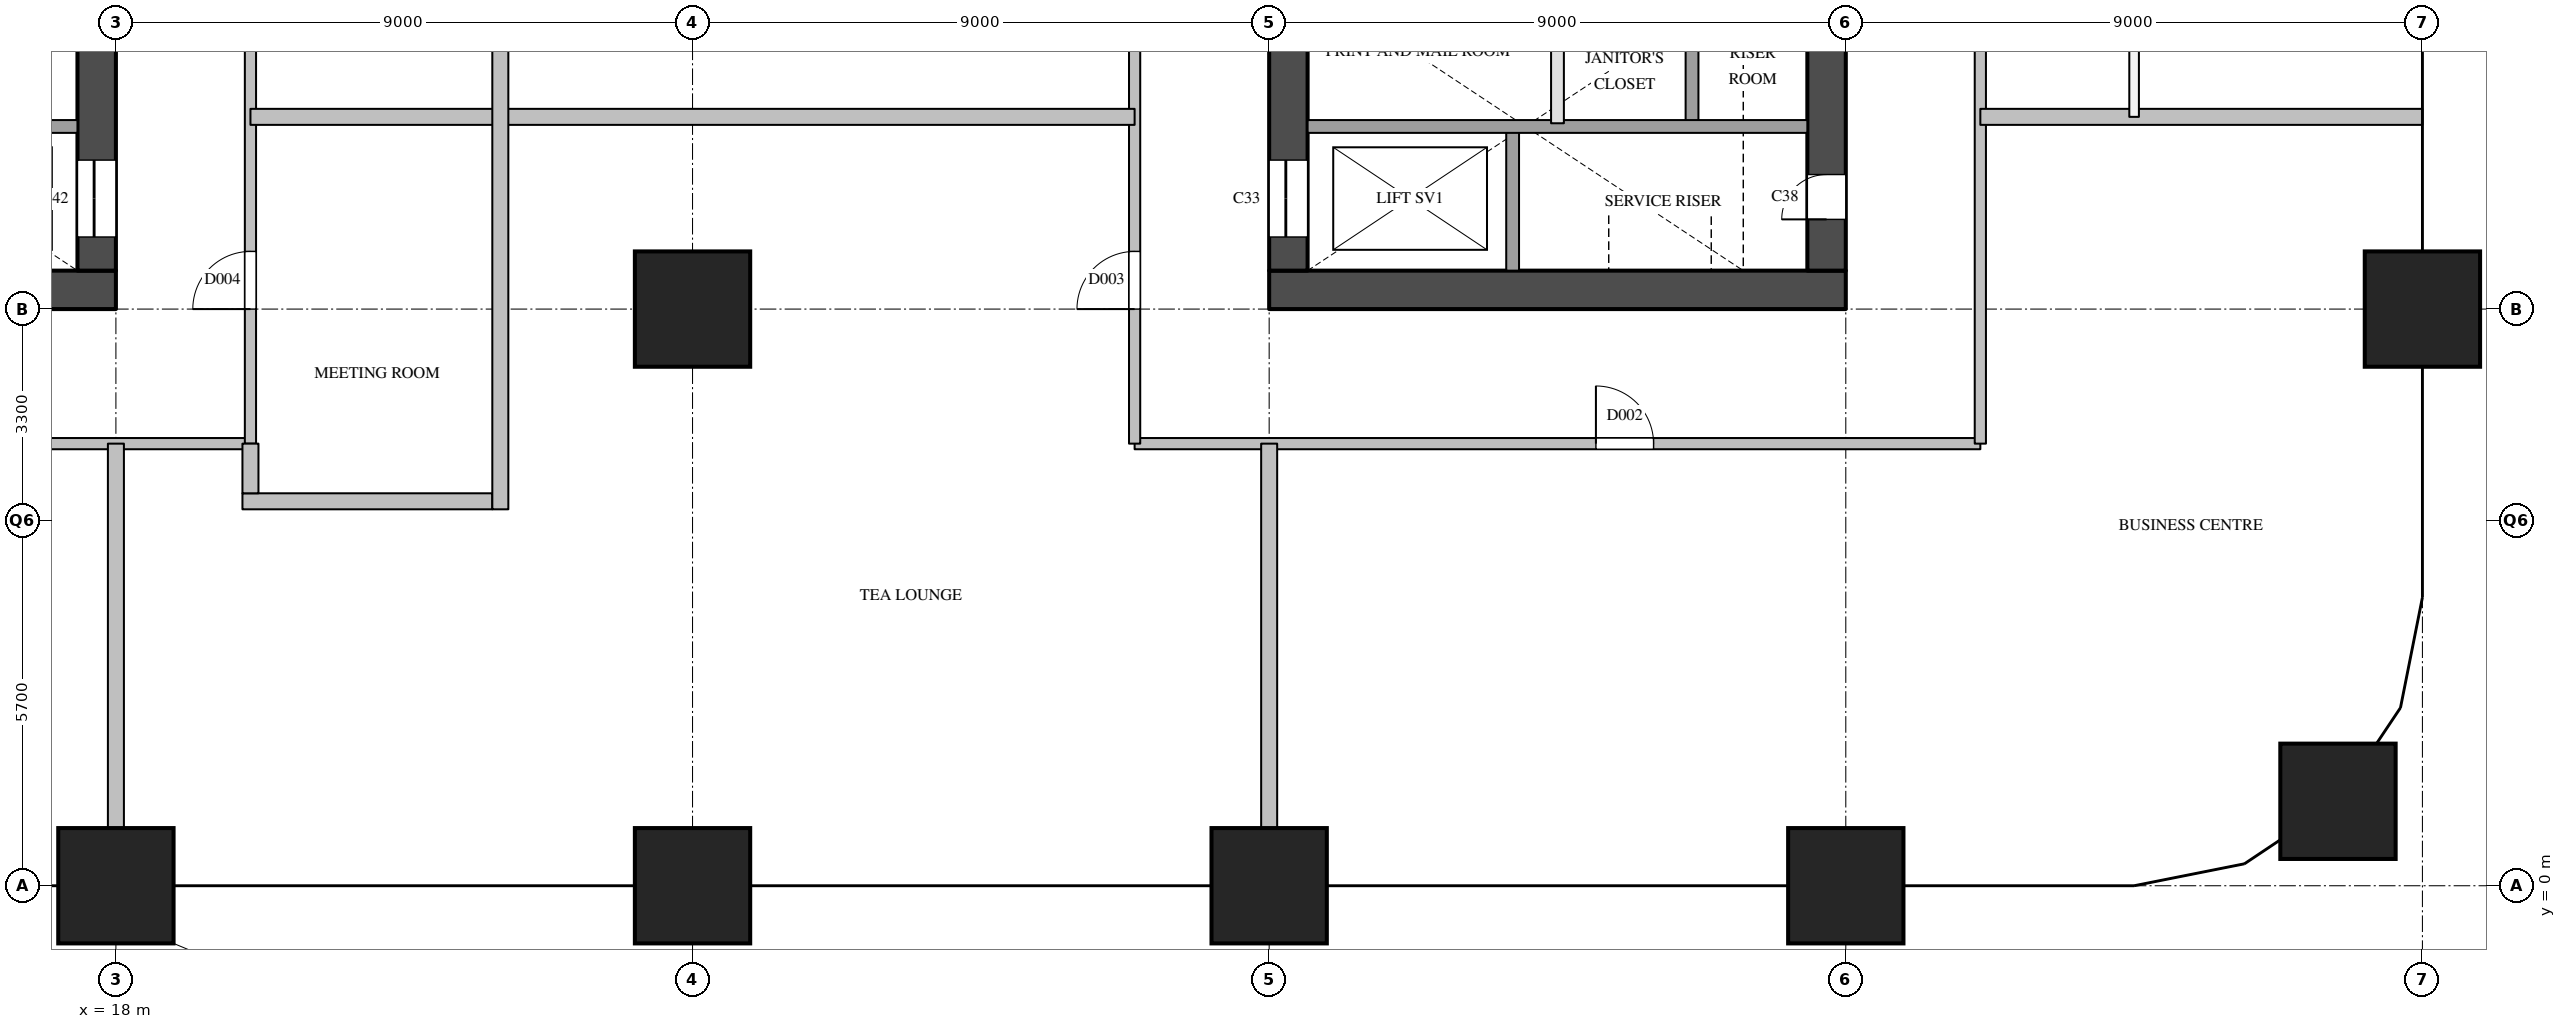
"""IFC4 building model, lengths in metres.
Left out: names, types, materials, properties, quantities, classifications, styles, units other than length and angle.
Written with IfcOpenShell. Run it as: python <this file> out.ifc"""

import sys

from ifc_helpers import new_model, si_unit, direction, frame, frame_2d, origin, origin_2d, place, context, subcontext, project, spatial, rectangle, extrude, element, fill, save


model = new_model("IFC4")
c1 = context("Model", 3, precision=1e-05, world=origin(), true_north=direction((0.0, 1.0)))
c2 = subcontext(c1, "Body", "Model", "MODEL_VIEW")
j1 = project(units=[si_unit("LENGTHUNIT", "METRE"), si_unit("PLANEANGLEUNIT", "RADIAN")], contexts=[c1])
p1 = place(None, origin())
s1 = spatial("IfcSite", under=j1, at=p1, CompositionType="ELEMENT")
p2 = place(p1, origin())
s2 = spatial("IfcBuilding", under=s1, at=p2, CompositionType="ELEMENT")
p3 = place(p2, frame((0.0, 0.0, 46.2)))
s3 = spatial("IfcBuildingStorey", under=s2, at=p3, CompositionType="ELEMENT", Elevation=46.2)
for number, where, z_axis, x_axis in (
    (1, (18.0, 0.0, 0.0), (0.0, 0.0, 1.0), (1.0, 0.0, 0.0)),
    (2, (27.0, 0.0, 0.0), (0.0, 0.0, 1.0), (1.0, 0.0, 0.0)),
    (3, (27.0, 9.0, 0.0), (0.0, 0.0, 1.0), (1.0, 0.0, 0.0)),
    (4, (36.0, 0.0, 0.0), (0.0, 0.0, 1.0), (1.0, 0.0, 0.0)),
    (5, (45.0, 0.0, 0.0), (0.0, 0.0, 1.0), (1.0, 0.0, 0.0)),
    (6, (52.682, 1.318, 0.0), (0.0, 0.0, 1.0), (1.0, 0.0, 0.0)),
    (7, (54.0, 9.0, 0.0), (0.0, 0.0, 1.0), (1.0, 0.0, 0.0)),
):
    element("IfcColumn", number, at=place(p3, frame(where, z_axis=z_axis, x_axis=x_axis)), inside=s3, PredefinedType="COLUMN", context=c2, shape_type="SweptSolid", body=[
        extrude(rectangle(XDim=1.8, YDim=1.8, at=origin_2d()), origin(), (0.0, 0.0, 1.0), 3.8),
    ])
p4 = place(p3, frame((36.0, 9.3, 0.0), z_axis=(0.0, 0.0, 1.0), x_axis=(1.0, 0.0, 0.0)))
e8 = element("IfcWall", 8, at=p4, inside=s3, PredefinedType="SHEAR", context=c2, shape_type="SweptSolid", body=[
    extrude(rectangle(XDim=9.0, YDim=0.6, at=frame_2d((4.5, 0.0))), origin(), (0.0, 0.0, 1.0), 3.5),
])
p5 = place(p3, frame((36.3, 9.6, 0.0), z_axis=(0.0, 0.0, 1.0), x_axis=(0.0, 1.0, 0.0)))
e9 = element("IfcWall", 9, at=p5, inside=s3, PredefinedType="SHEAR", context=c2, shape_type="SweptSolid", body=[
    extrude(rectangle(XDim=12.3, YDim=0.6, at=frame_2d((6.15, 0.0))), origin(), (0.0, 0.0, 1.0), 3.5),
])
p6 = place(p5, frame((0.525, 0.0, 0.0)))
e10 = element("IfcOpeningElement", 10, at=p6, cuts=e9, PredefinedType="OPENING", context=c2, shape_type="SweptSolid", body=[
    extrude(rectangle(XDim=1.2, YDim=2.1, at=frame_2d((0.6, 1.05))), frame((0.0, 0.31, 0.0), z_axis=(0.0, -1.0, 0.0), x_axis=(1.0, 0.0, 0.0)), (0.0, 0.0, 1.0), 0.62),
])
p7 = place(p5, frame((4.8, 0.0, 0.0)))
e11 = element("IfcOpeningElement", 11, at=p7, cuts=e9, PredefinedType="OPENING", context=c2, shape_type="SweptSolid", body=[
    extrude(rectangle(XDim=1.0, YDim=2.1, at=frame_2d((0.5, 1.05))), frame((0.0, 0.31, 0.0), z_axis=(0.0, -1.0, 0.0), x_axis=(1.0, 0.0, 0.0)), (0.0, 0.0, 1.0), 0.62),
])
p8 = place(p3, frame((44.7, 9.6, 0.0), z_axis=(0.0, 0.0, 1.0), x_axis=(0.0, 1.0, 0.0)))
e12 = element("IfcWall", 12, at=p8, inside=s3, PredefinedType="SHEAR", context=c2, shape_type="SweptSolid", body=[
    extrude(rectangle(XDim=12.3, YDim=0.6, at=frame_2d((6.15, 0.0))), origin(), (0.0, 0.0, 1.0), 3.5),
])
p9 = place(p8, frame((0.8, 0.0, 0.0)))
e13 = element("IfcOpeningElement", 13, at=p9, cuts=e12, PredefinedType="OPENING", context=c2, shape_type="SweptSolid", body=[
    extrude(rectangle(XDim=0.7, YDim=2.1, at=frame_2d((0.35, 1.05))), frame((0.0, 0.31, 0.0), z_axis=(0.0, -1.0, 0.0), x_axis=(1.0, 0.0, 0.0)), (0.0, 0.0, 1.0), 0.62),
])
p10 = place(p3, frame((39.8, 9.6, 0.0), z_axis=(0.0, 0.0, 1.0), x_axis=(0.0, 1.0, 0.0)))
e14 = element("IfcWall", 14, at=p10, inside=s3, PredefinedType="SOLIDWALL", context=c2, shape_type="SweptSolid", body=[
    extrude(rectangle(XDim=2.3, YDim=0.2, at=frame_2d((1.15, 0.0))), origin(), (0.0, 0.0, 1.0), 3.5),
])
p11 = place(p3, frame((40.5, 11.9, 0.0), z_axis=(0.0, 0.0, 1.0), x_axis=(0.0, 1.0, 0.0)))
e15 = element("IfcWall", 15, at=p11, inside=s3, PredefinedType="PARTITIONING", context=c2, shape_type="SweptSolid", body=[
    extrude(rectangle(XDim=2.2, YDim=0.2, at=frame_2d((1.1, 0.0))), origin(), (0.0, 0.0, 1.0), 3.5),
])
p12 = place(p3, frame((42.6, 11.9, 0.0), z_axis=(0.0, 0.0, 1.0), x_axis=(0.0, 1.0, 0.0)))
e16 = element("IfcWall", 16, at=p12, inside=s3, PredefinedType="SOLIDWALL", context=c2, shape_type="SweptSolid", body=[
    extrude(rectangle(XDim=2.2, YDim=0.2, at=frame_2d((1.1, 0.0))), origin(), (0.0, 0.0, 1.0), 3.5),
])
p13 = place(p3, frame((36.6, 11.85, 0.0), z_axis=(0.0, 0.0, 1.0), x_axis=(1.0, 0.0, 0.0)))
e17 = element("IfcWall", 17, at=p13, inside=s3, PredefinedType="SOLIDWALL", context=c2, shape_type="SweptSolid", body=[
    extrude(rectangle(XDim=7.8, YDim=0.2, at=frame_2d((3.9, 0.0))), origin(), (0.0, 0.0, 1.0), 3.5),
])
p14 = place(p3, frame((9.0, 9.3, 0.0), z_axis=(0.0, 0.0, 1.0), x_axis=(1.0, 0.0, 0.0)))
e18 = element("IfcWall", 18, at=p14, inside=s3, PredefinedType="SHEAR", context=c2, shape_type="SweptSolid", body=[
    extrude(rectangle(XDim=9.0, YDim=0.6, at=frame_2d((4.5, 0.0))), origin(), (0.0, 0.0, 1.0), 3.5),
])
p15 = place(p3, frame((17.7, 9.6, 0.0), z_axis=(0.0, 0.0, 1.0), x_axis=(0.0, 1.0, 0.0)))
e19 = element("IfcWall", 19, at=p15, inside=s3, PredefinedType="SHEAR", context=c2, shape_type="SweptSolid", body=[
    extrude(rectangle(XDim=12.3, YDim=0.6, at=frame_2d((6.15, 0.0))), origin(), (0.0, 0.0, 1.0), 3.5),
])
p16 = place(p15, frame((0.525, 0.0, 0.0)))
e20 = element("IfcOpeningElement", 20, at=p16, cuts=e19, PredefinedType="OPENING", context=c2, shape_type="SweptSolid", body=[
    extrude(rectangle(XDim=1.2, YDim=2.1, at=frame_2d((0.6, 1.05))), frame((0.0, 0.31, 0.0), z_axis=(0.0, -1.0, 0.0), x_axis=(1.0, 0.0, 0.0)), (0.0, 0.0, 1.0), 0.62),
])
p17 = place(p3, frame((9.6, 11.85, 0.0), z_axis=(0.0, 0.0, 1.0), x_axis=(1.0, 0.0, 0.0)))
e21 = element("IfcWall", 21, at=p17, inside=s3, PredefinedType="SOLIDWALL", context=c2, shape_type="SweptSolid", body=[
    extrude(rectangle(XDim=7.8, YDim=0.2, at=frame_2d((3.9, 0.0))), origin(), (0.0, 0.0, 1.0), 3.5),
])
p18 = place(p3, frame((6.9, 6.9, 0.0), z_axis=(0.0, 0.0, 1.0), x_axis=(1.0, 0.0, 0.0)))
e22 = element("IfcWall", 22, at=p18, inside=s3, PredefinedType="PARTITIONING", context=c2, shape_type="SweptSolid", body=[
    extrude(rectangle(XDim=13.2, YDim=0.175, at=frame_2d((6.6, 0.0))), origin(), (0.0, 0.0, 1.0), 3.5),
])
p19 = place(p18, frame((5.1, 0.0, 0.0)))
e23 = element("IfcOpeningElement", 23, at=p19, cuts=e22, PredefinedType="OPENING", context=c2, shape_type="SweptSolid", body=[
    extrude(rectangle(XDim=0.9, YDim=2.1, at=frame_2d((0.45, 1.05))), frame((0.0, 0.097, 0.0), z_axis=(0.0, -1.0, 0.0), x_axis=(1.0, 0.0, 0.0)), (0.0, 0.0, 1.0), 0.195),
])
p20 = place(p3, frame((33.9, 6.9, 0.0), z_axis=(0.0, 0.0, 1.0), x_axis=(1.0, 0.0, 0.0)))
e24 = element("IfcWall", 24, at=p20, inside=s3, PredefinedType="PARTITIONING", context=c2, shape_type="SweptSolid", body=[
    extrude(rectangle(XDim=13.2, YDim=0.175, at=frame_2d((6.6, 0.0))), origin(), (0.0, 0.0, 1.0), 3.5),
])
p21 = place(p20, frame((7.2, 0.0, 0.0)))
e25 = element("IfcOpeningElement", 25, at=p21, cuts=e24, PredefinedType="OPENING", context=c2, shape_type="SweptSolid", body=[
    extrude(rectangle(XDim=0.9, YDim=2.1, at=frame_2d((0.45, 1.05))), frame((0.0, 0.097, 0.0), z_axis=(0.0, -1.0, 0.0), x_axis=(1.0, 0.0, 0.0)), (0.0, 0.0, 1.0), 0.195),
])
p22 = place(p3, frame((20.1, 6.9, 0.0), z_axis=(0.0, 0.0, 1.0), x_axis=(0.0, 1.0, 0.0)))
e26 = element("IfcWall", 26, at=p22, inside=s3, PredefinedType="PARTITIONING", context=c2, shape_type="SweptSolid", body=[
    extrude(rectangle(XDim=12.45, YDim=0.175, at=frame_2d((6.225, 0.0))), origin(), (0.0, 0.0, 1.0), 3.5),
])
p23 = place(p22, frame((2.1, 0.0, 0.0)))
e27 = element("IfcOpeningElement", 27, at=p23, cuts=e26, PredefinedType="OPENING", context=c2, shape_type="SweptSolid", body=[
    extrude(rectangle(XDim=0.9, YDim=2.1, at=frame_2d((0.45, 1.05))), frame((0.0, 0.097, 0.0), z_axis=(0.0, -1.0, 0.0), x_axis=(1.0, 0.0, 0.0)), (0.0, 0.0, 1.0), 0.195),
])
p24 = place(p22, frame((8.275, 0.0, 0.0)))
e28 = element("IfcOpeningElement", 28, at=p24, cuts=e26, PredefinedType="OPENING", context=c2, shape_type="SweptSolid", body=[
    extrude(rectangle(XDim=1.0, YDim=2.1, at=frame_2d((0.5, 1.05))), frame((0.0, 0.097, 0.0), z_axis=(0.0, -1.0, 0.0), x_axis=(1.0, 0.0, 0.0)), (0.0, 0.0, 1.0), 0.195),
])
p25 = place(p3, frame((33.9, 6.9, 0.0), z_axis=(0.0, 0.0, 1.0), x_axis=(0.0, 1.0, 0.0)))
e29 = element("IfcWall", 29, at=p25, inside=s3, PredefinedType="PARTITIONING", context=c2, shape_type="SweptSolid", body=[
    extrude(rectangle(XDim=12.45, YDim=0.175, at=frame_2d((6.225, 0.0))), origin(), (0.0, 0.0, 1.0), 3.5),
])
p26 = place(p25, frame((2.1, 0.0, 0.0)))
e30 = element("IfcOpeningElement", 30, at=p26, cuts=e29, PredefinedType="OPENING", context=c2, shape_type="SweptSolid", body=[
    extrude(rectangle(XDim=0.9, YDim=2.1, at=frame_2d((0.45, 1.05))), frame((0.0, 0.097, 0.0), z_axis=(0.0, -1.0, 0.0), x_axis=(1.0, 0.0, 0.0)), (0.0, 0.0, 1.0), 0.195),
])
p27 = place(p3, frame((47.1, 6.9, 0.0), z_axis=(0.0, 0.0, 1.0), x_axis=(0.0, 1.0, 0.0)))
e31 = element("IfcWall", 31, at=p27, inside=s3, PredefinedType="PARTITIONING", context=c2, shape_type="SweptSolid", body=[
    extrude(rectangle(XDim=17.09, YDim=0.175, at=frame_2d((8.545, 0.0))), origin(), (0.0, 0.0, 1.0), 3.5),
])
p28 = place(p27, frame((9.4, 0.0, 0.0)))
e32 = element("IfcOpeningElement", 32, at=p28, cuts=e31, PredefinedType="OPENING", context=c2, shape_type="SweptSolid", body=[
    extrude(rectangle(XDim=1.0, YDim=2.1, at=frame_2d((0.5, 1.05))), frame((0.0, 0.097, 0.0), z_axis=(0.0, -1.0, 0.0), x_axis=(1.0, 0.0, 0.0)), (0.0, 0.0, 1.0), 0.195),
])
p29 = place(p3, frame((49.5, 12.0, 0.0), z_axis=(0.0, 0.0, 1.0), x_axis=(0.0, 1.0, 0.0)))
e33 = element("IfcWall", 33, at=p29, inside=s3, PredefinedType="PARTITIONING", context=c2, shape_type="SweptSolid", body=[
    extrude(rectangle(XDim=9.6, YDim=0.15, at=frame_2d((4.8, 0.0))), origin(), (0.0, 0.0, 1.0), 3.5),
])
p30 = place(p29, frame((4.35, 0.0, 0.0)))
e34 = element("IfcOpeningElement", 34, at=p30, cuts=e33, PredefinedType="OPENING", context=c2, shape_type="SweptSolid", body=[
    extrude(rectangle(XDim=0.9, YDim=2.1, at=frame_2d((0.45, 1.05))), frame((0.0, 0.085, 0.0), z_axis=(0.0, -1.0, 0.0), x_axis=(1.0, 0.0, 0.0)), (0.0, 0.0, 1.0), 0.17),
])
p31 = place(p3, frame((19.975, 6.0, 0.0), z_axis=(0.0, 0.0, 1.0), x_axis=(1.0, 0.0, 0.0)))
e35 = element("IfcWall", 35, at=p31, inside=s3, PredefinedType="PARTITIONING", context=c2, shape_type="SweptSolid", body=[
    extrude(rectangle(XDim=3.9, YDim=0.25, at=frame_2d((1.95, 0.0))), origin(), (0.0, 0.0, 1.0), 3.5),
])
p32 = place(p3, frame((20.1, 12.0, 0.0), z_axis=(0.0, 0.0, 1.0), x_axis=(1.0, 0.0, 0.0)))
e36 = element("IfcWall", 36, at=p32, inside=s3, PredefinedType="PARTITIONING", context=c2, shape_type="SweptSolid", body=[
    extrude(rectangle(XDim=13.8, YDim=0.25, at=frame_2d((6.9, 0.0))), origin(), (0.0, 0.0, 1.0), 2.5),
])
p33 = place(p3, frame((47.1, 12.0, 0.0), z_axis=(0.0, 0.0, 1.0), x_axis=(1.0, 0.0, 0.0)))
e37 = element("IfcWall", 37, at=p33, inside=s3, PredefinedType="PARTITIONING", context=c2, shape_type="SweptSolid", body=[
    extrude(rectangle(XDim=6.9, YDim=0.25, at=frame_2d((3.45, 0.0))), origin(), (0.0, 0.0, 1.0), 2.5),
])
p34 = place(p3, frame((18.0, 0.0, 0.0), z_axis=(0.0, 0.0, 1.0), x_axis=(0.0, 1.0, 0.0)))
e38 = element("IfcWall", 38, at=p34, inside=s3, PredefinedType="PARTITIONING", context=c2, shape_type="SweptSolid", body=[
    extrude(rectangle(XDim=6.9, YDim=0.25, at=frame_2d((3.45, 0.0))), origin(), (0.0, 0.0, 1.0), 3.5),
])
p35 = place(p3, frame((20.1, 6.125, 0.0), z_axis=(0.0, 0.0, 1.0), x_axis=(0.0, 1.0, 0.0)))
e39 = element("IfcWall", 39, at=p35, inside=s3, PredefinedType="PARTITIONING", context=c2, shape_type="SweptSolid", body=[
    extrude(rectangle(XDim=0.775, YDim=0.25, at=frame_2d((0.387, 0.0))), origin(), (0.0, 0.0, 1.0), 3.5),
])
p36 = place(p3, frame((24.0, 5.875, 0.0), z_axis=(0.0, 0.0, 1.0), x_axis=(0.0, 1.0, 0.0)))
e40 = element("IfcWall", 40, at=p36, inside=s3, PredefinedType="PARTITIONING", context=c2, shape_type="SweptSolid", body=[
    extrude(rectangle(XDim=13.475, YDim=0.25, at=frame_2d((6.738, 0.0))), origin(), (0.0, 0.0, 1.0), 3.5),
])
p37 = place(p3, frame((36.0, 0.0, 0.0), z_axis=(0.0, 0.0, 1.0), x_axis=(0.0, 1.0, 0.0)))
e41 = element("IfcWall", 41, at=p37, inside=s3, PredefinedType="PARTITIONING", context=c2, shape_type="SweptSolid", body=[
    extrude(rectangle(XDim=6.9, YDim=0.25, at=frame_2d((3.45, 0.0))), origin(), (0.0, 0.0, 1.0), 3.5),
])
p38 = place(p6, origin())
e42 = element("IfcDoor", 42, at=p38, inside=s3, OperationType="SLIDING_TO_LEFT", PredefinedType="DOOR", context=c2, shape_type="SweptSolid", body=[
    extrude(rectangle(XDim=1.2, YDim=2.1, at=frame_2d((0.6, 1.05))), frame((0.0, 0.025, 0.0), z_axis=(0.0, -1.0, 0.0), x_axis=(1.0, 0.0, 0.0)), (0.0, 0.0, 1.0), 0.05),
])
fill(e10, e42)
p39 = place(p9, origin())
e43 = element("IfcDoor", 43, at=p39, inside=s3, OperationType="SINGLE_SWING_LEFT", PredefinedType="DOOR", context=c2, shape_type="SweptSolid", body=[
    extrude(rectangle(XDim=0.7, YDim=2.1, at=frame_2d((0.35, 1.05))), frame((0.0, 0.025, 0.0), z_axis=(0.0, -1.0, 0.0), x_axis=(1.0, 0.0, 0.0)), (0.0, 0.0, 1.0), 0.05),
])
fill(e13, e43)
p40 = place(p16, origin())
e44 = element("IfcDoor", 44, at=p40, inside=s3, OperationType="SLIDING_TO_LEFT", PredefinedType="DOOR", context=c2, shape_type="SweptSolid", body=[
    extrude(rectangle(XDim=1.2, YDim=2.1, at=frame_2d((0.6, 1.05))), frame((0.0, 0.025, 0.0), z_axis=(0.0, -1.0, 0.0), x_axis=(1.0, 0.0, 0.0)), (0.0, 0.0, 1.0), 0.05),
])
fill(e20, e44)
p41 = place(p21, origin())
e45 = element("IfcDoor", 45, at=p41, inside=s3, OperationType="SINGLE_SWING_LEFT", PredefinedType="DOOR", context=c2, shape_type="SweptSolid", body=[
    extrude(rectangle(XDim=0.9, YDim=2.1, at=frame_2d((0.45, 1.05))), frame((0.0, 0.025, 0.0), z_axis=(0.0, -1.0, 0.0), x_axis=(1.0, 0.0, 0.0)), (0.0, 0.0, 1.0), 0.05),
])
fill(e25, e45)
p42 = place(p26, origin())
e46 = element("IfcDoor", 46, at=p42, inside=s3, OperationType="SINGLE_SWING_LEFT", PredefinedType="DOOR", context=c2, shape_type="SweptSolid", body=[
    extrude(rectangle(XDim=0.9, YDim=2.1, at=frame_2d((0.45, 1.05))), frame((0.0, 0.025, 0.0), z_axis=(0.0, -1.0, 0.0), x_axis=(1.0, 0.0, 0.0)), (0.0, 0.0, 1.0), 0.05),
])
fill(e30, e46)
p43 = place(p23, origin())
e47 = element("IfcDoor", 47, at=p43, inside=s3, OperationType="SINGLE_SWING_LEFT", PredefinedType="DOOR", context=c2, shape_type="SweptSolid", body=[
    extrude(rectangle(XDim=0.9, YDim=2.1, at=frame_2d((0.45, 1.05))), frame((0.0, 0.025, 0.0), z_axis=(0.0, -1.0, 0.0), x_axis=(1.0, 0.0, 0.0)), (0.0, 0.0, 1.0), 0.05),
])
fill(e27, e47)
save(model, sys.argv[1])
